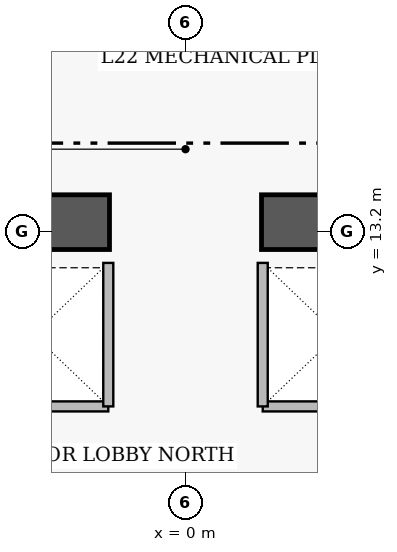
"""IFC4 building model, lengths in metres.
Left out: names, types, materials, properties, quantities, classifications, styles, units other than length and angle.
Written with IfcOpenShell. Run it as: python <this file> out.ifc"""

import sys

from ifc_helpers import new_model, si_unit, direction, frame, frame_2d, origin, place, context, subcontext, project, spatial, rectangle, extrude, element, save


model = new_model("IFC4")
c1 = context("Model", 3, precision=1e-05, world=origin(), true_north=direction((0.0, 1.0)))
c2 = subcontext(c1, "Body", "Model", "MODEL_VIEW")
j1 = project(units=[si_unit("LENGTHUNIT", "METRE"), si_unit("PLANEANGLEUNIT", "RADIAN")], contexts=[c1])
p1 = place(None, origin())
s1 = spatial("IfcSite", under=j1, at=p1, CompositionType="ELEMENT")
p2 = place(p1, origin())
s2 = spatial("IfcBuilding", under=s1, at=p2, CompositionType="ELEMENT")
p3 = place(p2, frame((0.0, 0.0, 89.65)))
s3 = spatial("IfcBuildingStorey", under=s2, at=p3, CompositionType="ELEMENT", Elevation=89.65)
for number, where, z_axis, x_axis in (
    (1, (-8.85, 13.35, 0.0), (0.0, 0.0, 1.0), (1.0, 0.0, 0.0)),
    (2, (1.25, 13.35, 0.0), (0.0, 0.0, 1.0), (1.0, 0.0, 0.0)),
):
    element("IfcWall", number, at=place(p3, frame(where, z_axis=z_axis, x_axis=x_axis)), inside=s3, PredefinedType="SHEAR", context=c2, shape_type="SweptSolid", body=[
        extrude(rectangle(XDim=7.6, YDim=0.9, at=frame_2d((3.8, 0.0))), origin(), (0.0, 0.0, 1.0), 5.74),
    ])
p4 = place(p3, frame((-3.75, 10.32, 0.0), z_axis=(0.0, 0.0, 1.0), x_axis=(1.0, 0.0, 0.0)))
e3 = element("IfcWall", 3, at=p4, inside=s3, PredefinedType="PARTITIONING", context=c2, shape_type="SweptSolid", body=[
    extrude(rectangle(XDim=2.48, YDim=0.165, at=frame_2d((1.24, 0.0))), origin(), (0.0, 0.0, 1.0), 5.74),
])
p5 = place(p3, frame((-1.27, 10.32, 0.0), z_axis=(0.0, 0.0, 1.0), x_axis=(0.0, 1.0, 0.0)))
e4 = element("IfcWall", 4, at=p5, inside=s3, PredefinedType="PARTITIONING", context=c2, shape_type="SweptSolid", body=[
    extrude(rectangle(XDim=2.36, YDim=0.165, at=frame_2d((1.18, 0.0))), origin(), (0.0, 0.0, 1.0), 5.74),
])
p6 = place(p3, frame((1.27, 10.32, 0.0), z_axis=(0.0, 0.0, 1.0), x_axis=(1.0, 0.0, 0.0)))
e5 = element("IfcWall", 5, at=p6, inside=s3, PredefinedType="PARTITIONING", context=c2, shape_type="SweptSolid", body=[
    extrude(rectangle(XDim=2.48, YDim=0.165, at=frame_2d((1.24, 0.0))), origin(), (0.0, 0.0, 1.0), 5.74),
])
p7 = place(p3, frame((1.27, 10.32, 0.0), z_axis=(0.0, 0.0, 1.0), x_axis=(0.0, 1.0, 0.0)))
e6 = element("IfcWall", 6, at=p7, inside=s3, PredefinedType="PARTITIONING", context=c2, shape_type="SweptSolid", body=[
    extrude(rectangle(XDim=2.36, YDim=0.165, at=frame_2d((1.18, 0.0))), origin(), (0.0, 0.0, 1.0), 5.74),
])
save(model, sys.argv[1])
